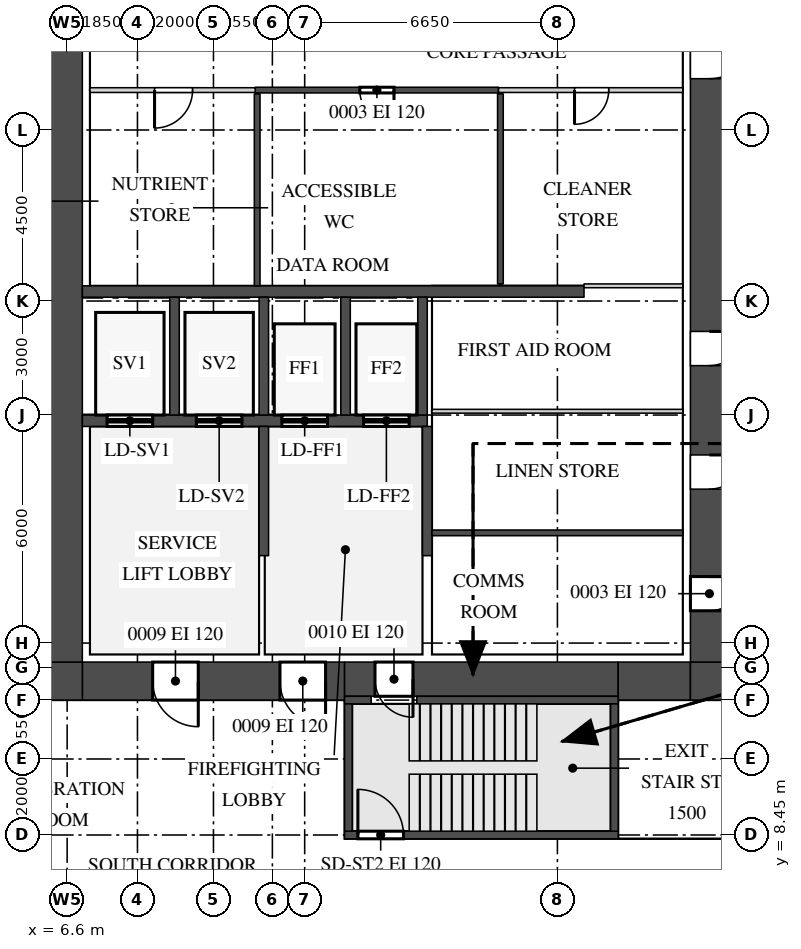
"""IFC4 building model, lengths in metres.
Left out: names, types, materials, properties, quantities, classifications, styles, units other than length and angle.
Written with IfcOpenShell. Run it as: python <this file> out.ifc"""

import sys

from ifc_helpers import new_model, si_unit, direction, frame, frame_2d, origin, place, context, subcontext, project, spatial, rectangle, extrude, source, transform, mapped, element, fill, save


model = new_model("IFC4")
c1 = context("Model", 3, precision=1e-05, world=origin(), true_north=direction((0.0, 1.0)))
c2 = subcontext(c1, "Body", "Model", "MODEL_VIEW")
j1 = project(units=[si_unit("LENGTHUNIT", "METRE"), si_unit("PLANEANGLEUNIT", "RADIAN")], contexts=[c1])
p1 = place(None, origin())
s1 = spatial("IfcSite", under=j1, at=p1, CompositionType="ELEMENT")
p2 = place(p1, origin())
s2 = spatial("IfcBuilding", under=s1, at=p2, CompositionType="ELEMENT")
p3 = place(p2, frame((0.0, 0.0, 127.9)))
s3 = spatial("IfcBuildingStorey", under=s2, at=p3, CompositionType="ELEMENT", Elevation=127.9)
m1 = source(origin(), c2, "Body", "SweptSolid", [
    extrude(rectangle(XDim=6.9, YDim=1.0, at=frame_2d((3.45, 0.0))), origin(), (0.0, 0.0, 1.0), 4.1),
])
p4 = place(p3, frame((7.0, 12.5, 0.0), z_axis=(0.0, 0.0, 1.0), x_axis=(1.0, 0.0, 0.0)))
e1 = element("IfcWall", 1, at=p4, inside=s3, PredefinedType="SHEAR", context=c2, shape_type="MappedRepresentation", body=[
    mapped(m1, transform((0.0, 0.0, 0.0))),
])
m2 = source(origin(), c2, "Body", "SweptSolid", [
    extrude(rectangle(XDim=1.2, YDim=2.1, at=frame_2d((0.6, 1.05))), frame((0.0, 0.51, 0.0), z_axis=(0.0, -1.0, 0.0), x_axis=(1.0, 0.0, 0.0)), (0.0, 0.0, 1.0), 1.02),
])
p5 = place(p4, frame((5.2, 0.0, 0.0)))
e2 = element("IfcOpeningElement", 2, at=p5, cuts=e1, PredefinedType="OPENING", context=c2, shape_type="MappedRepresentation", body=[
    mapped(m2, transform((0.0, 0.0, 0.0))),
])
p6 = place(p4, frame((1.85, 0.0, 0.0)))
e3 = element("IfcOpeningElement", 3, at=p6, cuts=e1, PredefinedType="OPENING", context=c2, shape_type="MappedRepresentation", body=[
    mapped(m2, transform((0.0, 0.0, 0.0))),
])
m3 = source(origin(), c2, "Body", "SweptSolid", [
    extrude(rectangle(XDim=7.2, YDim=0.9, at=frame_2d((3.6, 0.0))), origin(), (0.0, 0.0, 1.0), 4.1),
])
p7 = place(p3, frame((13.9, 12.55, 0.0), z_axis=(0.0, 0.0, 1.0), x_axis=(1.0, 0.0, 0.0)))
e4 = element("IfcWall", 4, at=p7, inside=s3, PredefinedType="SHEAR", context=c2, shape_type="MappedRepresentation", body=[
    mapped(m3, transform((0.0, 0.0, 0.0))),
])
m4 = source(origin(), c2, "Body", "SweptSolid", [
    extrude(rectangle(XDim=1.0, YDim=2.1, at=frame_2d((0.5, 1.05))), frame((0.0, 0.46, 0.0), z_axis=(0.0, -1.0, 0.0), x_axis=(1.0, 0.0, 0.0)), (0.0, 0.0, 1.0), 0.92),
])
p8 = place(p7, frame((0.8, 0.0, 0.0)))
e5 = element("IfcOpeningElement", 5, at=p8, cuts=e4, PredefinedType="OPENING", context=c2, shape_type="MappedRepresentation", body=[
    mapped(m4, transform((0.0, 0.0, 0.0))),
])
m5 = source(origin(), c2, "Body", "SweptSolid", [
    extrude(rectangle(XDim=1.9, YDim=1.0, at=frame_2d((0.95, 0.0))), origin(), (0.0, 0.0, 1.0), 4.1),
])
p9 = place(p3, frame((21.1, 12.5, 0.0), z_axis=(0.0, 0.0, 1.0), x_axis=(1.0, 0.0, 0.0)))
e6 = element("IfcWall", 6, at=p9, inside=s3, PredefinedType="SHEAR", context=c2, shape_type="MappedRepresentation", body=[
    mapped(m5, transform((0.0, 0.0, 0.0))),
])
m6 = source(origin(), c2, "Body", "SweptSolid", [
    extrude(rectangle(XDim=1.0, YDim=1.0, at=frame_2d((0.5, 0.0))), origin(), (0.0, 0.0, 1.0), 4.1),
])
for number, where, z_axis, x_axis in (
    (7, (23.0, 12.5, 0.0), (0.0, 0.0, 1.0), (1.0, 0.0, 0.0)),
    (8, (6.0, 12.5, 0.0), (0.0, 0.0, 1.0), (1.0, 0.0, 0.0)),
):
    element("IfcWall", number, at=place(p3, frame(where, z_axis=z_axis, x_axis=x_axis)), inside=s3, PredefinedType="SHEAR", context=c2, shape_type="MappedRepresentation", body=[
        mapped(m6, transform((0.0, 0.0, 0.0))),
    ])
m7 = source(origin(), c2, "Body", "SweptSolid", [
    extrude(rectangle(XDim=28.0, YDim=1.0, at=frame_2d((14.0, 0.0))), origin(), (0.0, 0.0, 1.0), 4.1),
])
p10 = place(p3, frame((23.5, 13.0, 0.0), z_axis=(0.0, 0.0, 1.0), x_axis=(0.0, 1.0, 0.0)))
e9 = element("IfcWall", 9, at=p10, inside=s3, PredefinedType="SHEAR", context=c2, shape_type="MappedRepresentation", body=[
    mapped(m7, transform((0.0, 0.0, 0.0))),
])
m8 = source(origin(), c2, "Body", "SweptSolid", [
    extrude(rectangle(XDim=1.8, YDim=2.1, at=frame_2d((0.9, 1.05))), frame((0.0, 0.51, 0.0), z_axis=(0.0, -1.0, 0.0), x_axis=(1.0, 0.0, 0.0)), (0.0, 0.0, 1.0), 1.02),
])
p11 = place(p10, frame((22.6, 0.0, 0.0)))
e10 = element("IfcOpeningElement", 10, at=p11, cuts=e9, PredefinedType="OPENING", context=c2, shape_type="MappedRepresentation", body=[
    mapped(m8, transform((0.0, 0.0, 0.0))),
])
p12 = place(p10, frame((15.35, 0.0, 0.0)))
e11 = element("IfcOpeningElement", 11, at=p12, cuts=e9, PredefinedType="OPENING", context=c2, shape_type="MappedRepresentation", body=[
    mapped(m2, transform((0.0, 0.0, 0.0))),
])
m9 = source(origin(), c2, "Body", "SweptSolid", [
    extrude(rectangle(XDim=0.9, YDim=2.1, at=frame_2d((0.45, 1.05))), frame((0.0, 0.51, 0.0), z_axis=(0.0, -1.0, 0.0), x_axis=(1.0, 0.0, 0.0)), (0.0, 0.0, 1.0), 1.02),
])
p13 = place(p10, frame((1.35, 0.0, 0.0)))
e12 = element("IfcOpeningElement", 12, at=p13, cuts=e9, PredefinedType="OPENING", context=c2, shape_type="MappedRepresentation", body=[
    mapped(m9, transform((0.0, 0.0, 0.0))),
])
p14 = place(p10, frame((4.55, 0.0, 0.0)))
e13 = element("IfcOpeningElement", 13, at=p14, cuts=e9, PredefinedType="OPENING", context=c2, shape_type="MappedRepresentation", body=[
    mapped(m9, transform((0.0, 0.0, 0.0))),
])
p15 = place(p10, frame((7.8, 0.0, 0.0)))
e14 = element("IfcOpeningElement", 14, at=p15, cuts=e9, PredefinedType="OPENING", context=c2, shape_type="MappedRepresentation", body=[
    mapped(m9, transform((0.0, 0.0, 0.0))),
])
p16 = place(p3, frame((6.5, 13.0, 0.0), z_axis=(0.0, 0.0, 1.0), x_axis=(0.0, 1.0, 0.0)))
e15 = element("IfcWall", 15, at=p16, inside=s3, PredefinedType="SHEAR", context=c2, shape_type="MappedRepresentation", body=[
    mapped(m7, transform((0.0, 0.0, 0.0))),
])
m10 = source(origin(), c2, "Body", "SweptSolid", [
    extrude(rectangle(XDim=0.7, YDim=0.2, at=frame_2d((0.35, 0.0))), origin(), (0.0, 0.0, 1.0), 4.1),
])
p17 = place(p3, frame((13.9, 12.0, 0.0), z_axis=(0.0, 0.0, 1.0), x_axis=(1.0, 0.0, 0.0)))
e16 = element("IfcWall", 16, at=p17, inside=s3, PredefinedType="SHEAR", context=c2, shape_type="MappedRepresentation", body=[
    mapped(m10, transform((0.0, 0.0, 0.0))),
])
m11 = source(origin(), c2, "Body", "SweptSolid", [
    extrude(rectangle(XDim=5.3, YDim=0.2, at=frame_2d((2.65, 0.0))), origin(), (0.0, 0.0, 1.0), 4.1),
])
p18 = place(p3, frame((15.8, 12.0, 0.0), z_axis=(0.0, 0.0, 1.0), x_axis=(1.0, 0.0, 0.0)))
e17 = element("IfcWall", 17, at=p18, inside=s3, PredefinedType="SHEAR", context=c2, shape_type="MappedRepresentation", body=[
    mapped(m11, transform((0.0, 0.0, 0.0))),
])
m12 = source(origin(), c2, "Body", "SweptSolid", [
    extrude(rectangle(XDim=7.2, YDim=0.2, at=frame_2d((3.6, 0.0))), origin(), (0.0, 0.0, 1.0), 4.1),
])
p19 = place(p3, frame((13.9, 8.45, 0.0), z_axis=(0.0, 0.0, 1.0), x_axis=(1.0, 0.0, 0.0)))
e18 = element("IfcWall", 18, at=p19, inside=s3, PredefinedType="SHEAR", context=c2, shape_type="MappedRepresentation", body=[
    mapped(m12, transform((0.0, 0.0, 0.0))),
])
m13 = source(origin(), c2, "Body", "SweptSolid", [
    extrude(rectangle(XDim=1.2, YDim=2.1, at=frame_2d((0.6, 1.05))), frame((0.0, 0.11, 0.0), z_axis=(0.0, -1.0, 0.0), x_axis=(1.0, 0.0, 0.0)), (0.0, 0.0, 1.0), 0.22),
])
p20 = place(p19, frame((0.35, 0.0, 0.0)))
e19 = element("IfcOpeningElement", 19, at=p20, cuts=e18, PredefinedType="OPENING", context=c2, shape_type="MappedRepresentation", body=[
    mapped(m13, transform((0.0, 0.0, 0.0))),
])
m14 = source(origin(), c2, "Body", "SweptSolid", [
    extrude(rectangle(XDim=3.35, YDim=0.2, at=frame_2d((1.675, 0.0))), origin(), (0.0, 0.0, 1.0), 4.1),
])
for number, where, z_axis, x_axis in (
    (20, (21.0, 8.55, 0.0), (0.0, 0.0, 1.0), (0.0, 1.0, 0.0)),
    (21, (14.0, 8.55, 0.0), (0.0, 0.0, 1.0), (0.0, 1.0, 0.0)),
):
    element("IfcWall", number, at=place(p3, frame(where, z_axis=z_axis, x_axis=x_axis)), inside=s3, PredefinedType="SHEAR", context=c2, shape_type="MappedRepresentation", body=[
        mapped(m14, transform((0.0, 0.0, 0.0))),
    ])
m15 = source(origin(), c2, "Body", "SweptSolid", [
    extrude(rectangle(XDim=13.2, YDim=0.3, at=frame_2d((6.6, 0.0))), origin(), (0.0, 0.0, 1.0), 4.1),
])
p21 = place(p3, frame((7.0, 22.75, 0.0), z_axis=(0.0, 0.0, 1.0), x_axis=(1.0, 0.0, 0.0)))
e22 = element("IfcWall", 22, at=p21, inside=s3, PredefinedType="STANDARD", context=c2, shape_type="MappedRepresentation", body=[
    mapped(m15, transform((0.0, 0.0, 0.0))),
])
m16 = source(origin(), c2, "Body", "SweptSolid", [
    extrude(rectangle(XDim=9.075, YDim=0.3, at=frame_2d((4.538, 0.0))), origin(), (0.0, 0.0, 1.0), 4.1),
])
p22 = place(p3, frame((7.0, 19.35, 0.0), z_axis=(0.0, 0.0, 1.0), x_axis=(1.0, 0.0, 0.0)))
e23 = element("IfcWall", 23, at=p22, inside=s3, PredefinedType="STANDARD", context=c2, shape_type="MappedRepresentation", body=[
    mapped(m16, transform((0.0, 0.0, 0.0))),
])
m17 = source(origin(), c2, "Body", "SweptSolid", [
    extrude(rectangle(XDim=1.2, YDim=2.1, at=frame_2d((0.6, 1.05))), frame((0.0, 0.16, 0.0), z_axis=(0.0, -1.0, 0.0), x_axis=(1.0, 0.0, 0.0)), (0.0, 0.0, 1.0), 0.32),
])
p23 = place(p22, frame((0.65, 0.0, 0.0)))
e24 = element("IfcOpeningElement", 24, at=p23, cuts=e23, PredefinedType="OPENING", context=c2, shape_type="MappedRepresentation", body=[
    mapped(m17, transform((0.0, 0.0, 0.0))),
])
p24 = place(p22, frame((3.0, 0.0, 0.0)))
e25 = element("IfcOpeningElement", 25, at=p24, cuts=e23, PredefinedType="OPENING", context=c2, shape_type="MappedRepresentation", body=[
    mapped(m17, transform((0.0, 0.0, 0.0))),
])
p25 = place(p22, frame((5.25, 0.0, 0.0)))
e26 = element("IfcOpeningElement", 26, at=p25, cuts=e23, PredefinedType="OPENING", context=c2, shape_type="MappedRepresentation", body=[
    mapped(m17, transform((0.0, 0.0, 0.0))),
])
p26 = place(p22, frame((7.4, 0.0, 0.0)))
e27 = element("IfcOpeningElement", 27, at=p26, cuts=e23, PredefinedType="OPENING", context=c2, shape_type="MappedRepresentation", body=[
    mapped(m17, transform((0.0, 0.0, 0.0))),
])
m18 = source(origin(), c2, "Body", "SweptSolid", [
    extrude(rectangle(XDim=3.1, YDim=0.25, at=frame_2d((1.55, 0.0))), origin(), (0.0, 0.0, 1.0), 4.1),
])
for number, where, z_axis, x_axis in (
    (28, (9.425, 19.5, 0.0), (0.0, 0.0, 1.0), (0.0, 1.0, 0.0)),
    (29, (11.775, 19.5, 0.0), (0.0, 0.0, 1.0), (0.0, 1.0, 0.0)),
    (30, (13.925, 19.5, 0.0), (0.0, 0.0, 1.0), (0.0, 1.0, 0.0)),
    (31, (15.95, 19.5, 0.0), (0.0, 0.0, 1.0), (0.0, 1.0, 0.0)),
):
    element("IfcWall", number, at=place(p3, frame(where, z_axis=z_axis, x_axis=x_axis)), inside=s3, PredefinedType="STANDARD", context=c2, shape_type="MappedRepresentation", body=[
        mapped(m18, transform((0.0, 0.0, 0.0))),
    ])
m19 = source(origin(), c2, "Body", "SweptSolid", [
    extrude(rectangle(XDim=3.4, YDim=0.25, at=frame_2d((1.7, 0.0))), origin(), (0.0, 0.0, 1.0), 4.1),
])
for number, where, z_axis, x_axis in (
    (32, (16.075, 15.8, 0.0), (0.0, 0.0, 1.0), (0.0, 1.0, 0.0)),
    (33, (11.775, 15.8, 0.0), (0.0, 0.0, 1.0), (0.0, 1.0, 0.0)),
):
    element("IfcWall", number, at=place(p3, frame(where, z_axis=z_axis, x_axis=x_axis)), inside=s3, PredefinedType="STANDARD", context=c2, shape_type="MappedRepresentation", body=[
        mapped(m19, transform((0.0, 0.0, 0.0))),
    ])
m20 = source(origin(), c2, "Body", "SweptSolid", [
    extrude(rectangle(XDim=6.6, YDim=0.15, at=frame_2d((3.3, 0.0))), origin(), (0.0, 0.0, 1.0), 4.2),
])
p27 = place(p3, frame((16.2, 16.4, 0.0), z_axis=(0.0, 0.0, 1.0), x_axis=(1.0, 0.0, 0.0)))
e34 = element("IfcWall", 34, at=p27, inside=s3, PredefinedType="PARTITIONING", context=c2, shape_type="MappedRepresentation", body=[
    mapped(m20, transform((0.0, 0.0, 0.0))),
])
m21 = source(origin(), c2, "Body", "SweptSolid", [
    extrude(rectangle(XDim=6.6, YDim=0.1, at=frame_2d((3.3, 0.0))), origin(), (0.0, 0.0, 1.0), 4.2),
])
p28 = place(p3, frame((16.2, 19.6, 0.0), z_axis=(0.0, 0.0, 1.0), x_axis=(1.0, 0.0, 0.0)))
e35 = element("IfcWall", 35, at=p28, inside=s3, PredefinedType="PARTITIONING", context=c2, shape_type="MappedRepresentation", body=[
    mapped(m21, transform((0.0, 0.0, 0.0))),
])
m22 = source(origin(), c2, "Body", "SweptSolid", [
    extrude(rectangle(XDim=5.05, YDim=0.15, at=frame_2d((2.525, 0.0))), origin(), (0.0, 0.0, 1.0), 4.2),
])
p29 = place(p3, frame((11.6, 22.9, 0.0), z_axis=(0.0, 0.0, 1.0), x_axis=(0.0, 1.0, 0.0)))
e36 = element("IfcWall", 36, at=p29, inside=s3, PredefinedType="PARTITIONING", context=c2, shape_type="MappedRepresentation", body=[
    mapped(m22, transform((0.0, 0.0, 0.0))),
])
m23 = source(origin(), c2, "Body", "SweptSolid", [
    extrude(rectangle(XDim=2.6, YDim=0.1, at=frame_2d((1.3, 0.0))), origin(), (0.0, 0.0, 1.0), 4.2),
])
p30 = place(p3, frame((20.2, 22.9, 0.0), z_axis=(0.0, 0.0, 1.0), x_axis=(1.0, 0.0, 0.0)))
e37 = element("IfcWall", 37, at=p30, inside=s3, PredefinedType="PARTITIONING", context=c2, shape_type="MappedRepresentation", body=[
    mapped(m23, transform((0.0, 0.0, 0.0))),
])
m24 = source(origin(), c2, "Body", "SweptSolid", [
    extrude(rectangle(XDim=5.0, YDim=0.15, at=frame_2d((2.5, 0.0))), origin(), (0.0, 0.0, 1.0), 4.2),
])
p31 = place(p3, frame((18.0, 22.95, 0.0), z_axis=(0.0, 0.0, 1.0), x_axis=(0.0, 1.0, 0.0)))
e38 = element("IfcWall", 38, at=p31, inside=s3, PredefinedType="PARTITIONING", context=c2, shape_type="MappedRepresentation", body=[
    mapped(m24, transform((0.0, 0.0, 0.0))),
])
m25 = source(origin(), c2, "Body", "SweptSolid", [
    extrude(rectangle(XDim=4.35, YDim=0.125, at=frame_2d((2.175, 0.0))), origin(), (0.0, 0.0, 1.0), 4.2),
])
p32 = place(p3, frame((7.2, 28.05, 0.0), z_axis=(0.0, 0.0, 1.0), x_axis=(1.0, 0.0, 0.0)))
e39 = element("IfcWall", 39, at=p32, inside=s3, PredefinedType="PARTITIONING", context=c2, shape_type="MappedRepresentation", body=[
    mapped(m25, transform((0.0, 0.0, 0.0))),
])
m26 = source(origin(), c2, "Body", "SweptSolid", [
    extrude(rectangle(XDim=1.0, YDim=2.1, at=frame_2d((0.5, 1.05))), frame((0.0, 0.073, 0.0), z_axis=(0.0, -1.0, 0.0), x_axis=(1.0, 0.0, 0.0)), (0.0, 0.0, 1.0), 0.145),
])
p33 = place(p32, frame((1.7, 0.0, 0.0)))
e40 = element("IfcOpeningElement", 40, at=p33, cuts=e39, PredefinedType="OPENING", context=c2, shape_type="MappedRepresentation", body=[
    mapped(m26, transform((0.0, 0.0, 0.0))),
])
m27 = source(origin(), c2, "Body", "SweptSolid", [
    extrude(rectangle(XDim=6.4, YDim=0.15, at=frame_2d((3.2, 0.0))), origin(), (0.0, 0.0, 1.0), 4.2),
])
p34 = place(p3, frame((11.55, 28.05, 0.0), z_axis=(0.0, 0.0, 1.0), x_axis=(1.0, 0.0, 0.0)))
e41 = element("IfcWall", 41, at=p34, inside=s3, PredefinedType="PARTITIONING", context=c2, shape_type="MappedRepresentation", body=[
    mapped(m27, transform((0.0, 0.0, 0.0))),
])
m28 = source(origin(), c2, "Body", "SweptSolid", [
    extrude(rectangle(XDim=0.9, YDim=2.1, at=frame_2d((0.45, 1.05))), frame((0.0, 0.085, 0.0), z_axis=(0.0, -1.0, 0.0), x_axis=(1.0, 0.0, 0.0)), (0.0, 0.0, 1.0), 0.17),
])
p35 = place(p34, frame((2.75, 0.0, 0.0)))
e42 = element("IfcOpeningElement", 42, at=p35, cuts=e41, PredefinedType="OPENING", context=c2, shape_type="MappedRepresentation", body=[
    mapped(m28, transform((0.0, 0.0, 0.0))),
])
m29 = source(origin(), c2, "Body", "SweptSolid", [
    extrude(rectangle(XDim=4.85, YDim=0.125, at=frame_2d((2.425, 0.0))), origin(), (0.0, 0.0, 1.0), 4.2),
])
p36 = place(p3, frame((17.95, 28.05, 0.0), z_axis=(0.0, 0.0, 1.0), x_axis=(1.0, 0.0, 0.0)))
e43 = element("IfcWall", 43, at=p36, inside=s3, PredefinedType="PARTITIONING", context=c2, shape_type="MappedRepresentation", body=[
    mapped(m29, transform((0.0, 0.0, 0.0))),
])
m30 = source(origin(), c2, "Body", "SweptSolid", [
    extrude(rectangle(XDim=0.9, YDim=2.1, at=frame_2d((0.45, 1.05))), frame((0.0, 0.073, 0.0), z_axis=(0.0, -1.0, 0.0), x_axis=(1.0, 0.0, 0.0)), (0.0, 0.0, 1.0), 0.145),
])
p37 = place(p36, frame((2.0, 0.0, 0.0)))
e44 = element("IfcOpeningElement", 44, at=p37, cuts=e43, PredefinedType="OPENING", context=c2, shape_type="MappedRepresentation", body=[
    mapped(m30, transform((0.0, 0.0, 0.0))),
])
m31 = source(origin(), c2, "Body", "SweptSolid", [
    extrude(rectangle(XDim=1.2, YDim=2.1, at=frame_2d((0.6, 1.05))), frame((0.0, 0.45, 0.0), z_axis=(0.0, -1.0, 0.0), x_axis=(1.0, 0.0, 0.0)), (0.0, 0.0, 1.0), 0.9),
])
p38 = place(p12, origin())
e45 = element("IfcDoor", 45, at=p38, inside=s3, OperationType="SINGLE_SWING_RIGHT", PredefinedType="DOOR", context=c2, shape_type="MappedRepresentation", body=[
    mapped(m31, transform((0.0, 0.0, 0.0))),
])
fill(e11, e45)
m32 = source(origin(), c2, "Body", "SweptSolid", [
    extrude(rectangle(XDim=1.0, YDim=2.1, at=frame_2d((0.5, 1.05))), frame((0.0, 0.025, 0.0), z_axis=(0.0, -1.0, 0.0), x_axis=(1.0, 0.0, 0.0)), (0.0, 0.0, 1.0), 0.05),
])
p39 = place(p33, origin())
e46 = element("IfcDoor", 46, at=p39, inside=s3, OperationType="SINGLE_SWING_LEFT", PredefinedType="DOOR", context=c2, shape_type="MappedRepresentation", body=[
    mapped(m32, transform((0.0, 0.0, 0.0))),
])
fill(e40, e46)
m33 = source(origin(), c2, "Body", "SweptSolid", [
    extrude(rectangle(XDim=0.9, YDim=2.1, at=frame_2d((0.45, 1.05))), frame((0.0, 0.025, 0.0), z_axis=(0.0, -1.0, 0.0), x_axis=(1.0, 0.0, 0.0)), (0.0, 0.0, 1.0), 0.05),
])
p40 = place(p35, origin())
e47 = element("IfcDoor", 47, at=p40, inside=s3, OperationType="SINGLE_SWING_RIGHT", PredefinedType="DOOR", context=c2, shape_type="MappedRepresentation", body=[
    mapped(m33, transform((0.0, 0.0, 0.0))),
])
fill(e42, e47)
p41 = place(p37, origin())
e48 = element("IfcDoor", 48, at=p41, inside=s3, OperationType="SINGLE_SWING_LEFT", PredefinedType="DOOR", context=c2, shape_type="MappedRepresentation", body=[
    mapped(m33, transform((0.0, 0.0, 0.0))),
])
fill(e44, e48)
m34 = source(origin(), c2, "Body", "SweptSolid", [
    extrude(rectangle(XDim=0.9, YDim=2.1, at=frame_2d((0.45, 1.05))), frame((0.0, 0.45, 0.0), z_axis=(0.0, -1.0, 0.0), x_axis=(1.0, 0.0, 0.0)), (0.0, 0.0, 1.0), 0.9),
])
p42 = place(p13, origin())
e49 = element("IfcDoor", 49, at=p42, inside=s3, OperationType="SINGLE_SWING_RIGHT", PredefinedType="DOOR", context=c2, shape_type="MappedRepresentation", body=[
    mapped(m34, transform((0.0, 0.0, 0.0))),
])
fill(e12, e49)
p43 = place(p14, origin())
e50 = element("IfcDoor", 50, at=p43, inside=s3, OperationType="SINGLE_SWING_RIGHT", PredefinedType="DOOR", context=c2, shape_type="MappedRepresentation", body=[
    mapped(m34, transform((0.0, 0.0, 0.0))),
])
fill(e13, e50)
p44 = place(p15, origin())
e51 = element("IfcDoor", 51, at=p44, inside=s3, OperationType="SINGLE_SWING_RIGHT", PredefinedType="DOOR", context=c2, shape_type="MappedRepresentation", body=[
    mapped(m34, transform((0.0, 0.0, 0.0))),
])
fill(e14, e51)
p45 = place(p5, origin())
e52 = element("IfcDoor", 52, at=p45, inside=s3, OperationType="SINGLE_SWING_RIGHT", PredefinedType="DOOR", context=c2, shape_type="MappedRepresentation", body=[
    mapped(m31, transform((0.0, 0.0, 0.0))),
])
fill(e2, e52)
p46 = place(p6, origin())
e53 = element("IfcDoor", 53, at=p46, inside=s3, OperationType="SINGLE_SWING_RIGHT", PredefinedType="DOOR", context=c2, shape_type="MappedRepresentation", body=[
    mapped(m31, transform((0.0, 0.0, 0.0))),
])
fill(e3, e53)
m35 = source(origin(), c2, "Body", "SweptSolid", [
    extrude(rectangle(XDim=1.0, YDim=2.1, at=frame_2d((0.5, 1.05))), frame((0.0, 0.4, 0.0), z_axis=(0.0, -1.0, 0.0), x_axis=(1.0, 0.0, 0.0)), (0.0, 0.0, 1.0), 0.8),
])
p47 = place(p8, origin())
e54 = element("IfcDoor", 54, at=p47, inside=s3, OperationType="SINGLE_SWING_RIGHT", PredefinedType="DOOR", context=c2, shape_type="MappedRepresentation", body=[
    mapped(m35, transform((0.0, 0.0, 0.0))),
])
fill(e5, e54)
m36 = source(origin(), c2, "Body", "SweptSolid", [
    extrude(rectangle(XDim=1.2, YDim=2.1, at=frame_2d((0.6, 1.05))), frame((0.0, 0.025, 0.0), z_axis=(0.0, -1.0, 0.0), x_axis=(1.0, 0.0, 0.0)), (0.0, 0.0, 1.0), 0.05),
])
p48 = place(p20, origin())
e55 = element("IfcDoor", 55, at=p48, inside=s3, OperationType="SINGLE_SWING_RIGHT", PredefinedType="DOOR", context=c2, shape_type="MappedRepresentation", body=[
    mapped(m36, transform((0.0, 0.0, 0.0))),
])
fill(e19, e55)
p49 = place(p23, origin())
e56 = element("IfcDoor", 56, at=p49, inside=s3, OperationType="DOUBLE_DOOR_SLIDING", PredefinedType="DOOR", context=c2, shape_type="MappedRepresentation", body=[
    mapped(m36, transform((0.0, 0.0, 0.0))),
])
fill(e24, e56)
p50 = place(p24, origin())
e57 = element("IfcDoor", 57, at=p50, inside=s3, OperationType="DOUBLE_DOOR_SLIDING", PredefinedType="DOOR", context=c2, shape_type="MappedRepresentation", body=[
    mapped(m36, transform((0.0, 0.0, 0.0))),
])
fill(e25, e57)
p51 = place(p25, origin())
e58 = element("IfcDoor", 58, at=p51, inside=s3, OperationType="DOUBLE_DOOR_SLIDING", PredefinedType="DOOR", context=c2, shape_type="MappedRepresentation", body=[
    mapped(m36, transform((0.0, 0.0, 0.0))),
])
fill(e26, e58)
p52 = place(p26, origin())
e59 = element("IfcDoor", 59, at=p52, inside=s3, OperationType="DOUBLE_DOOR_SLIDING", PredefinedType="DOOR", context=c2, shape_type="MappedRepresentation", body=[
    mapped(m36, transform((0.0, 0.0, 0.0))),
])
fill(e27, e59)
save(model, sys.argv[1])
